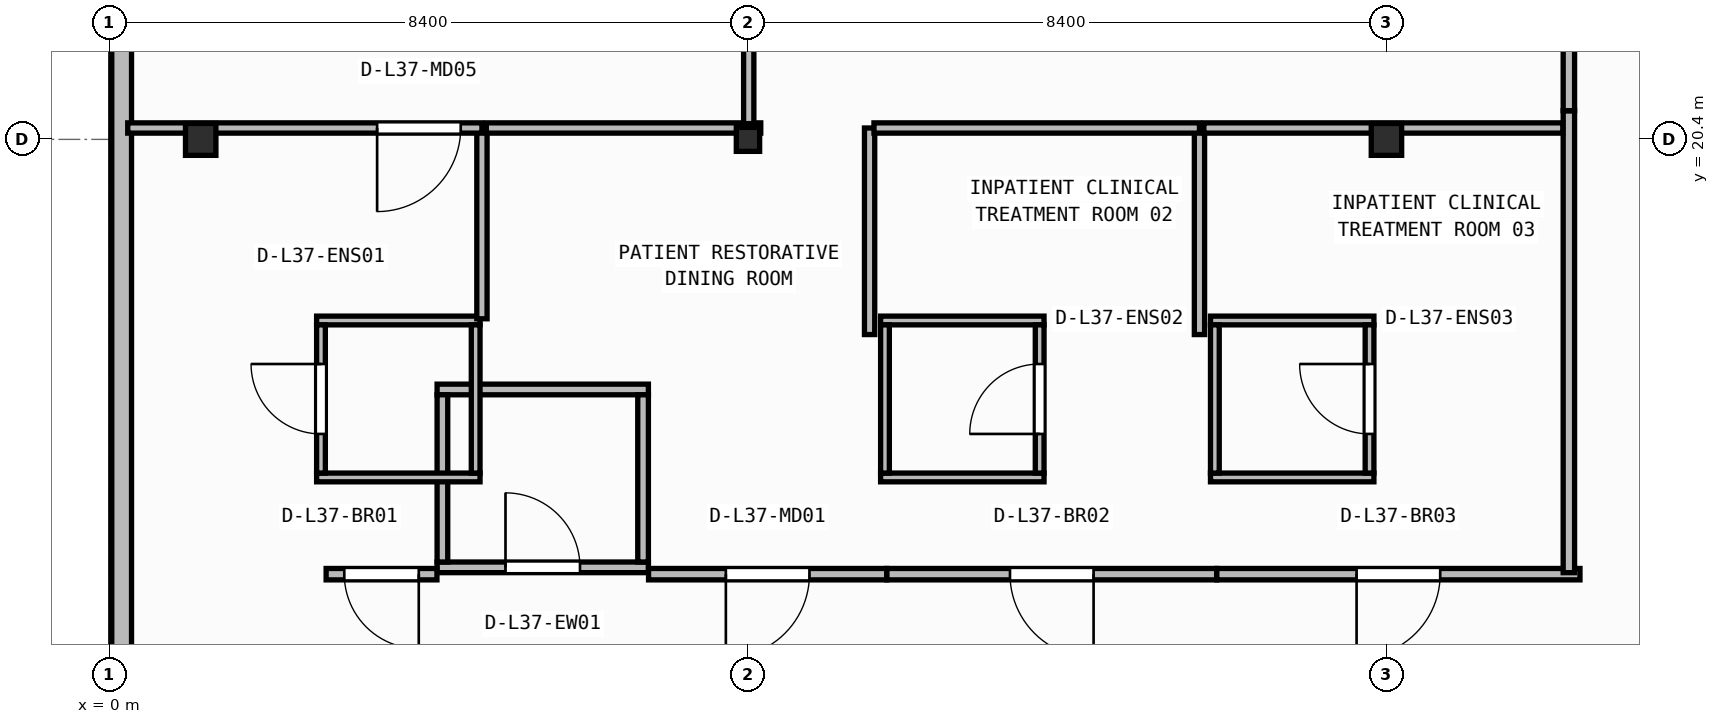
"""IFC4 building model, lengths in metres.
Left out: names, types, materials, properties, quantities, classifications, styles, units other than length and angle.
Written with IfcOpenShell. Run it as: python <this file> out.ifc"""

import sys

from ifc_helpers import new_model, si_unit, direction, frame, frame_2d, origin, origin_2d, place, context, subcontext, project, spatial, rectangle, i_section, extrude, element, fill, save


model = new_model("IFC4")
c1 = context("Model", 3, precision=1e-05, world=origin(), true_north=direction((0.0, 1.0)))
c2 = subcontext(c1, "Body", "Model", "MODEL_VIEW")
j1 = project(units=[si_unit("LENGTHUNIT", "METRE"), si_unit("PLANEANGLEUNIT", "RADIAN")], contexts=[c1])
p1 = place(None, origin())
s1 = spatial("IfcSite", under=j1, at=p1, CompositionType="ELEMENT")
p2 = place(p1, origin())
s2 = spatial("IfcBuilding", under=s1, at=p2, CompositionType="ELEMENT")
p3 = place(p2, frame((0.0, 0.0, 150.75)))
s3 = spatial("IfcBuildingStorey", under=s2, at=p3, CompositionType="ELEMENT", Elevation=150.75)
p4 = place(p3, frame((1.2, 20.4, 0.0), z_axis=(0.0, 0.0, 1.0), x_axis=(1.0, 0.0, 0.0)))
e1 = element("IfcColumn", 1, at=p4, inside=s3, PredefinedType="COLUMN", context=c2, shape_type="SweptSolid", body=[
    extrude(i_section(OverallWidth=0.4, OverallDepth=0.42, WebThickness=0.025, FlangeThickness=0.04, at=origin_2d()), origin(), (0.0, 0.0, 1.0), 3.95),
])
p5 = place(p3, frame((8.4, 20.4, 0.0), z_axis=(0.0, 0.0, 1.0), x_axis=(1.0, 0.0, 0.0)))
e2 = element("IfcColumn", 2, at=p5, inside=s3, PredefinedType="COLUMN", context=c2, shape_type="SweptSolid", body=[
    extrude(i_section(OverallWidth=0.307, OverallDepth=0.315, WebThickness=0.012, FlangeThickness=0.019, FilletRadius=0.017, at=origin_2d()), origin(), (0.0, 0.0, 1.0), 3.95),
])
p6 = place(p3, frame((16.8, 20.4, 0.0), z_axis=(0.0, 0.0, 1.0), x_axis=(1.0, 0.0, 0.0)))
e3 = element("IfcColumn", 3, at=p6, inside=s3, PredefinedType="COLUMN", context=c2, shape_type="SweptSolid", body=[
    extrude(i_section(OverallWidth=0.4, OverallDepth=0.42, WebThickness=0.025, FlangeThickness=0.04, at=origin_2d()), origin(), (0.0, 0.0, 1.0), 3.95),
])
p7 = place(p3, frame((0.16, 40.64, 0.0), z_axis=(0.0, 0.0, 1.0), x_axis=(0.0, -1.0, 0.0)))
e4 = element("IfcWall", 4, at=p7, inside=s3, PredefinedType="STANDARD", context=c2, shape_type="SweptSolid", body=[
    extrude(rectangle(XDim=37.88, YDim=0.26, at=frame_2d((18.94, 0.0))), origin(), (0.0, 0.0, 1.0), 3.71),
])
p8 = place(p7, frame((27.795, 0.0, 0.9)))
e5 = element("IfcOpeningElement", 5, at=p8, cuts=e4, PredefinedType="OPENING", context=c2, shape_type="SweptSolid", body=[
    extrude(rectangle(XDim=2.4, YDim=1.65, at=frame_2d((1.2, 0.825))), frame((0.0, 0.14, 0.0), z_axis=(0.0, -1.0, 0.0), x_axis=(1.0, 0.0, 0.0)), (0.0, 0.0, 1.0), 0.28),
])
p9 = place(p3, frame((4.31, 14.77, 0.0), z_axis=(0.0, 0.0, 1.0), x_axis=(1.0, 0.0, 0.0)))
e6 = element("IfcWall", 6, at=p9, inside=s3, PredefinedType="PARTITIONING", context=c2, shape_type="SweptSolid", body=[
    extrude(rectangle(XDim=2.78, YDim=0.14, at=frame_2d((1.39, 0.0))), origin(), (0.0, 0.0, 1.0), 3.71),
])
p10 = place(p9, frame((0.9, 0.0, 0.0)))
e7 = element("IfcOpeningElement", 7, at=p10, cuts=e6, PredefinedType="OPENING", context=c2, shape_type="SweptSolid", body=[
    extrude(rectangle(XDim=0.98, YDim=2.1, at=frame_2d((0.49, 1.05))), frame((0.0, 0.08, 0.0), z_axis=(0.0, -1.0, 0.0), x_axis=(1.0, 0.0, 0.0)), (0.0, 0.0, 1.0), 0.16),
])
p11 = place(p3, frame((4.31, 17.11, 0.0), z_axis=(0.0, 0.0, 1.0), x_axis=(1.0, 0.0, 0.0)))
e8 = element("IfcWall", 8, at=p11, inside=s3, PredefinedType="PARTITIONING", context=c2, shape_type="SweptSolid", body=[
    extrude(rectangle(XDim=2.78, YDim=0.14, at=frame_2d((1.39, 0.0))), origin(), (0.0, 0.0, 1.0), 3.71),
])
for number, where, z_axis, x_axis in (
    (9, (4.38, 14.84, 0.0), (0.0, 0.0, 1.0), (0.0, 1.0, 0.0)),
    (10, (7.02, 14.84, 0.0), (0.0, 0.0, 1.0), (0.0, 1.0, 0.0)),
):
    element("IfcWall", number, at=place(p3, frame(where, z_axis=z_axis, x_axis=x_axis)), inside=s3, PredefinedType="PARTITIONING", context=c2, shape_type="SweptSolid", body=[
        extrude(rectangle(XDim=2.2, YDim=0.14, at=frame_2d((1.1, 0.0))), origin(), (0.0, 0.0, 1.0), 3.71),
    ])
for number, where, z_axis, x_axis in (
    (11, (2.725, 15.952, 0.0), (0.0, 0.0, 1.0), (1.0, 0.0, 0.0)),
    (12, (2.725, 18.018, 0.0), (0.0, 0.0, 1.0), (1.0, 0.0, 0.0)),
):
    element("IfcWall", number, at=place(p3, frame(where, z_axis=z_axis, x_axis=x_axis)), inside=s3, PredefinedType="PARTITIONING", context=c2, shape_type="SweptSolid", body=[
        extrude(rectangle(XDim=2.15, YDim=0.115, at=frame_2d((1.075, 0.0))), origin(), (0.0, 0.0, 1.0), 3.71),
    ])
p12 = place(p3, frame((2.782, 16.01, 0.0), z_axis=(0.0, 0.0, 1.0), x_axis=(0.0, 1.0, 0.0)))
e13 = element("IfcWall", 13, at=p12, inside=s3, PredefinedType="PARTITIONING", context=c2, shape_type="SweptSolid", body=[
    extrude(rectangle(XDim=1.95, YDim=0.115, at=frame_2d((0.975, 0.0))), origin(), (0.0, 0.0, 1.0), 3.71),
])
p13 = place(p12, frame((0.515, 0.0, 0.0)))
e14 = element("IfcOpeningElement", 14, at=p13, cuts=e13, PredefinedType="OPENING", context=c2, shape_type="SweptSolid", body=[
    extrude(rectangle(XDim=0.92, YDim=2.1, at=frame_2d((0.46, 1.05))), frame((0.0, 0.067, 0.0), z_axis=(0.0, -1.0, 0.0), x_axis=(1.0, 0.0, 0.0)), (0.0, 0.0, 1.0), 0.135),
])
p14 = place(p3, frame((4.817, 16.01, 0.0), z_axis=(0.0, 0.0, 1.0), x_axis=(0.0, 1.0, 0.0)))
e15 = element("IfcWall", 15, at=p14, inside=s3, PredefinedType="PARTITIONING", context=c2, shape_type="SweptSolid", body=[
    extrude(rectangle(XDim=1.95, YDim=0.115, at=frame_2d((0.975, 0.0))), origin(), (0.0, 0.0, 1.0), 3.71),
])
for number, where, z_axis, x_axis in (
    (16, (10.145, 15.952, 0.0), (0.0, 0.0, 1.0), (1.0, 0.0, 0.0)),
    (17, (10.145, 18.018, 0.0), (0.0, 0.0, 1.0), (1.0, 0.0, 0.0)),
):
    element("IfcWall", number, at=place(p3, frame(where, z_axis=z_axis, x_axis=x_axis)), inside=s3, PredefinedType="PARTITIONING", context=c2, shape_type="SweptSolid", body=[
        extrude(rectangle(XDim=2.15, YDim=0.115, at=frame_2d((1.075, 0.0))), origin(), (0.0, 0.0, 1.0), 3.71),
    ])
p15 = place(p3, frame((10.202, 16.01, 0.0), z_axis=(0.0, 0.0, 1.0), x_axis=(0.0, 1.0, 0.0)))
e18 = element("IfcWall", 18, at=p15, inside=s3, PredefinedType="PARTITIONING", context=c2, shape_type="SweptSolid", body=[
    extrude(rectangle(XDim=1.95, YDim=0.115, at=frame_2d((0.975, 0.0))), origin(), (0.0, 0.0, 1.0), 3.71),
])
p16 = place(p3, frame((12.238, 16.01, 0.0), z_axis=(0.0, 0.0, 1.0), x_axis=(0.0, 1.0, 0.0)))
e19 = element("IfcWall", 19, at=p16, inside=s3, PredefinedType="PARTITIONING", context=c2, shape_type="SweptSolid", body=[
    extrude(rectangle(XDim=1.95, YDim=0.115, at=frame_2d((0.975, 0.0))), origin(), (0.0, 0.0, 1.0), 3.71),
])
p17 = place(p16, frame((0.515, 0.0, 0.0)))
e20 = element("IfcOpeningElement", 20, at=p17, cuts=e19, PredefinedType="OPENING", context=c2, shape_type="SweptSolid", body=[
    extrude(rectangle(XDim=0.92, YDim=2.1, at=frame_2d((0.46, 1.05))), frame((0.0, 0.067, 0.0), z_axis=(0.0, -1.0, 0.0), x_axis=(1.0, 0.0, 0.0)), (0.0, 0.0, 1.0), 0.135),
])
for number, where, z_axis, x_axis in (
    (21, (14.485, 15.952, 0.0), (0.0, 0.0, 1.0), (1.0, 0.0, 0.0)),
    (22, (14.485, 18.018, 0.0), (0.0, 0.0, 1.0), (1.0, 0.0, 0.0)),
):
    element("IfcWall", number, at=place(p3, frame(where, z_axis=z_axis, x_axis=x_axis)), inside=s3, PredefinedType="PARTITIONING", context=c2, shape_type="SweptSolid", body=[
        extrude(rectangle(XDim=2.15, YDim=0.115, at=frame_2d((1.075, 0.0))), origin(), (0.0, 0.0, 1.0), 3.71),
    ])
p18 = place(p3, frame((14.542, 16.01, 0.0), z_axis=(0.0, 0.0, 1.0), x_axis=(0.0, 1.0, 0.0)))
e23 = element("IfcWall", 23, at=p18, inside=s3, PredefinedType="PARTITIONING", context=c2, shape_type="SweptSolid", body=[
    extrude(rectangle(XDim=1.95, YDim=0.115, at=frame_2d((0.975, 0.0))), origin(), (0.0, 0.0, 1.0), 3.71),
])
p19 = place(p3, frame((16.577, 16.01, 0.0), z_axis=(0.0, 0.0, 1.0), x_axis=(0.0, 1.0, 0.0)))
e24 = element("IfcWall", 24, at=p19, inside=s3, PredefinedType="PARTITIONING", context=c2, shape_type="SweptSolid", body=[
    extrude(rectangle(XDim=1.95, YDim=0.115, at=frame_2d((0.975, 0.0))), origin(), (0.0, 0.0, 1.0), 3.71),
])
p20 = place(p19, frame((0.515, 0.0, 0.0)))
e25 = element("IfcOpeningElement", 25, at=p20, cuts=e24, PredefinedType="OPENING", context=c2, shape_type="SweptSolid", body=[
    extrude(rectangle(XDim=0.92, YDim=2.1, at=frame_2d((0.46, 1.05))), frame((0.0, 0.067, 0.0), z_axis=(0.0, -1.0, 0.0), x_axis=(1.0, 0.0, 0.0)), (0.0, 0.0, 1.0), 0.135),
])
p21 = place(p3, frame((4.308, 14.68, 0.0), z_axis=(0.0, 0.0, 1.0), x_axis=(-1.0, 0.0, 0.0)))
e26 = element("IfcWall", 26, at=p21, inside=s3, PredefinedType="PARTITIONING", context=c2, shape_type="SweptSolid", body=[
    extrude(rectangle(XDim=1.458, YDim=0.15, at=frame_2d((0.729, 0.0))), origin(), (0.0, 0.0, 1.0), 3.71),
])
p22 = place(p21, frame((0.239, 0.0, 0.0)))
e27 = element("IfcOpeningElement", 27, at=p22, cuts=e26, PredefinedType="OPENING", context=c2, shape_type="SweptSolid", body=[
    extrude(rectangle(XDim=0.98, YDim=2.1, at=frame_2d((0.49, 1.05))), frame((0.0, 0.085, 0.0), z_axis=(0.0, -1.0, 0.0), x_axis=(1.0, 0.0, 0.0)), (0.0, 0.0, 1.0), 0.17),
])
p23 = place(p3, frame((10.226, 14.68, 0.0), z_axis=(0.0, 0.0, 1.0), x_axis=(-1.0, 0.0, 0.0)))
e28 = element("IfcWall", 28, at=p23, inside=s3, PredefinedType="PARTITIONING", context=c2, shape_type="SweptSolid", body=[
    extrude(rectangle(XDim=3.134, YDim=0.15, at=frame_2d((1.567, 0.0))), origin(), (0.0, 0.0, 1.0), 3.71),
])
p24 = place(p23, frame((1.017, 0.0, 0.0)))
e29 = element("IfcOpeningElement", 29, at=p24, cuts=e28, PredefinedType="OPENING", context=c2, shape_type="SweptSolid", body=[
    extrude(rectangle(XDim=1.1, YDim=2.1, at=frame_2d((0.55, 1.05))), frame((0.0, 0.085, 0.0), z_axis=(0.0, -1.0, 0.0), x_axis=(1.0, 0.0, 0.0)), (0.0, 0.0, 1.0), 0.17),
])
p25 = place(p3, frame((14.566, 14.68, 0.0), z_axis=(0.0, 0.0, 1.0), x_axis=(-1.0, 0.0, 0.0)))
e30 = element("IfcWall", 30, at=p25, inside=s3, PredefinedType="PARTITIONING", context=c2, shape_type="SweptSolid", body=[
    extrude(rectangle(XDim=4.338, YDim=0.15, at=frame_2d((2.169, 0.0))), origin(), (0.0, 0.0, 1.0), 3.71),
])
p26 = place(p25, frame((1.619, 0.0, 0.0)))
e31 = element("IfcOpeningElement", 31, at=p26, cuts=e30, PredefinedType="OPENING", context=c2, shape_type="SweptSolid", body=[
    extrude(rectangle(XDim=1.1, YDim=2.1, at=frame_2d((0.55, 1.05))), frame((0.0, 0.085, 0.0), z_axis=(0.0, -1.0, 0.0), x_axis=(1.0, 0.0, 0.0)), (0.0, 0.0, 1.0), 0.17),
])
p27 = place(p3, frame((19.346, 14.68, 0.0), z_axis=(0.0, 0.0, 1.0), x_axis=(-1.0, 0.0, 0.0)))
e32 = element("IfcWall", 32, at=p27, inside=s3, PredefinedType="PARTITIONING", context=c2, shape_type="SweptSolid", body=[
    extrude(rectangle(XDim=4.778, YDim=0.15, at=frame_2d((2.389, 0.0))), origin(), (0.0, 0.0, 1.0), 3.71),
])
p28 = place(p27, frame((1.839, 0.0, 0.0)))
e33 = element("IfcOpeningElement", 33, at=p28, cuts=e32, PredefinedType="OPENING", context=c2, shape_type="SweptSolid", body=[
    extrude(rectangle(XDim=1.1, YDim=2.1, at=frame_2d((0.55, 1.05))), frame((0.0, 0.085, 0.0), z_axis=(0.0, -1.0, 0.0), x_axis=(1.0, 0.0, 0.0)), (0.0, 0.0, 1.0), 0.17),
])
p29 = place(p3, frame((19.2, 20.776, 0.0), z_axis=(0.0, 0.0, 1.0), x_axis=(0.0, -1.0, 0.0)))
e34 = element("IfcWall", 34, at=p29, inside=s3, PredefinedType="PARTITIONING", context=c2, shape_type="SweptSolid", body=[
    extrude(rectangle(XDim=6.076, YDim=0.15, at=frame_2d((3.038, 0.0))), origin(), (0.0, 0.0, 1.0), 3.71),
])
p30 = place(p3, frame((19.2, 27.26, 0.0), z_axis=(0.0, 0.0, 1.0), x_axis=(0.0, -1.0, 0.0)))
e35 = element("IfcWall", 35, at=p30, inside=s3, PredefinedType="PARTITIONING", context=c2, shape_type="SweptSolid", body=[
    extrude(rectangle(XDim=6.482, YDim=0.15, at=frame_2d((3.241, 0.0))), origin(), (0.0, 0.0, 1.0), 3.71),
])
p31 = place(p30, frame((2.068, 0.0, 0.0)))
e36 = element("IfcOpeningElement", 36, at=p31, cuts=e35, PredefinedType="OPENING", context=c2, shape_type="SweptSolid", body=[
    extrude(rectangle(XDim=1.1, YDim=2.1, at=frame_2d((0.55, 1.05))), frame((0.0, 0.085, 0.0), z_axis=(0.0, -1.0, 0.0), x_axis=(1.0, 0.0, 0.0)), (0.0, 0.0, 1.0), 0.17),
])
p32 = place(p3, frame((4.9, 18.04, 0.0), z_axis=(0.0, 0.0, 1.0), x_axis=(0.0, 1.0, 0.0)))
e37 = element("IfcWall", 37, at=p32, inside=s3, PredefinedType="PARTITIONING", context=c2, shape_type="SweptSolid", body=[
    extrude(rectangle(XDim=2.51, YDim=0.135, at=frame_2d((1.255, 0.0))), origin(), (0.0, 0.0, 1.0), 3.71),
])
p33 = place(p3, frame((4.9, 20.55, 0.0), z_axis=(0.0, 0.0, 1.0), x_axis=(-1.0, 0.0, 0.0)))
e38 = element("IfcWall", 38, at=p33, inside=s3, PredefinedType="PARTITIONING", context=c2, shape_type="SweptSolid", body=[
    extrude(rectangle(XDim=4.66, YDim=0.135, at=frame_2d((2.33, 0.0))), origin(), (0.0, 0.0, 1.0), 3.083),
])
p34 = place(p33, frame((0.279, 0.0, 0.0)))
e39 = element("IfcOpeningElement", 39, at=p34, cuts=e38, PredefinedType="OPENING", context=c2, shape_type="SweptSolid", body=[
    extrude(rectangle(XDim=1.1, YDim=2.1, at=frame_2d((0.55, 1.05))), frame((0.0, 0.077, 0.0), z_axis=(0.0, -1.0, 0.0), x_axis=(1.0, 0.0, 0.0)), (0.0, 0.0, 1.0), 0.155),
])
p35 = place(p3, frame((10.0, 17.833, 0.0), z_axis=(0.0, 0.0, 1.0), x_axis=(0.0, 1.0, 0.0)))
e40 = element("IfcWall", 40, at=p35, inside=s3, PredefinedType="PARTITIONING", context=c2, shape_type="SweptSolid", body=[
    extrude(rectangle(XDim=2.718, YDim=0.135, at=frame_2d((1.359, 0.0))), origin(), (0.0, 0.0, 1.0), 3.71),
])
p36 = place(p3, frame((8.568, 20.55, 0.0), z_axis=(0.0, 0.0, 1.0), x_axis=(-1.0, 0.0, 0.0)))
e41 = element("IfcWall", 41, at=p36, inside=s3, PredefinedType="PARTITIONING", context=c2, shape_type="SweptSolid", body=[
    extrude(rectangle(XDim=3.611, YDim=0.135, at=frame_2d((1.805, 0.0))), origin(), (0.0, 0.0, 1.0), 3.083),
])
p37 = place(p3, frame((14.34, 17.833, 0.0), z_axis=(0.0, 0.0, 1.0), x_axis=(0.0, 1.0, 0.0)))
e42 = element("IfcWall", 42, at=p37, inside=s3, PredefinedType="PARTITIONING", context=c2, shape_type="SweptSolid", body=[
    extrude(rectangle(XDim=2.718, YDim=0.135, at=frame_2d((1.359, 0.0))), origin(), (0.0, 0.0, 1.0), 3.71),
])
p38 = place(p3, frame((14.34, 20.55, 0.0), z_axis=(0.0, 0.0, 1.0), x_axis=(-1.0, 0.0, 0.0)))
e43 = element("IfcWall", 43, at=p38, inside=s3, PredefinedType="PARTITIONING", context=c2, shape_type="SweptSolid", body=[
    extrude(rectangle(XDim=4.282, YDim=0.135, at=frame_2d((2.141, 0.0))), origin(), (0.0, 0.0, 1.0), 3.083),
])
p39 = place(p3, frame((19.12, 20.55, 0.0), z_axis=(0.0, 0.0, 1.0), x_axis=(-1.0, 0.0, 0.0)))
e44 = element("IfcWall", 44, at=p39, inside=s3, PredefinedType="PARTITIONING", context=c2, shape_type="SweptSolid", body=[
    extrude(rectangle(XDim=4.723, YDim=0.135, at=frame_2d((2.361, 0.0))), origin(), (0.0, 0.0, 1.0), 3.083),
])
p40 = place(p3, frame((8.41, 20.607, 0.0), z_axis=(0.0, 0.0, 1.0), x_axis=(0.0, 1.0, 0.0)))
e45 = element("IfcWall", 45, at=p40, inside=s3, PredefinedType="PARTITIONING", context=c2, shape_type="SweptSolid", body=[
    extrude(rectangle(XDim=6.493, YDim=0.135, at=frame_2d((3.246, 0.0))), origin(), (0.0, 0.0, 1.0), 3.152),
])
p41 = place(p10, origin())
e46 = element("IfcDoor", 46, at=p41, inside=s3, OperationType="SINGLE_SWING_LEFT", PredefinedType="DOOR", context=c2, shape_type="SweptSolid", body=[
    extrude(rectangle(XDim=0.98, YDim=2.1, at=frame_2d((0.49, 1.05))), frame((0.0, 0.025, 0.0), z_axis=(0.0, -1.0, 0.0), x_axis=(1.0, 0.0, 0.0)), (0.0, 0.0, 1.0), 0.05),
])
fill(e7, e46)
p42 = place(p13, origin())
e47 = element("IfcDoor", 47, at=p42, inside=s3, OperationType="SINGLE_SWING_RIGHT", PredefinedType="DOOR", context=c2, shape_type="SweptSolid", body=[
    extrude(rectangle(XDim=0.92, YDim=2.1, at=frame_2d((0.46, 1.05))), frame((0.0, 0.025, 0.0), z_axis=(0.0, -1.0, 0.0), x_axis=(1.0, 0.0, 0.0)), (0.0, 0.0, 1.0), 0.05),
])
fill(e14, e47)
p43 = place(p17, origin())
e48 = element("IfcDoor", 48, at=p43, inside=s3, OperationType="SINGLE_SWING_LEFT", PredefinedType="DOOR", context=c2, shape_type="SweptSolid", body=[
    extrude(rectangle(XDim=0.92, YDim=2.1, at=frame_2d((0.46, 1.05))), frame((0.0, 0.025, 0.0), z_axis=(0.0, -1.0, 0.0), x_axis=(1.0, 0.0, 0.0)), (0.0, 0.0, 1.0), 0.05),
])
fill(e20, e48)
p44 = place(p20, origin())
e49 = element("IfcDoor", 49, at=p44, inside=s3, OperationType="SINGLE_SWING_RIGHT", PredefinedType="DOOR", context=c2, shape_type="SweptSolid", body=[
    extrude(rectangle(XDim=0.92, YDim=2.1, at=frame_2d((0.46, 1.05))), frame((0.0, 0.025, 0.0), z_axis=(0.0, -1.0, 0.0), x_axis=(1.0, 0.0, 0.0)), (0.0, 0.0, 1.0), 0.05),
])
fill(e25, e49)
p45 = place(p22, origin())
e50 = element("IfcDoor", 50, at=p45, inside=s3, OperationType="SINGLE_SWING_LEFT", PredefinedType="DOOR", context=c2, shape_type="SweptSolid", body=[
    extrude(rectangle(XDim=0.98, YDim=2.1, at=frame_2d((0.49, 1.05))), frame((0.0, 0.025, 0.0), z_axis=(0.0, -1.0, 0.0), x_axis=(1.0, 0.0, 0.0)), (0.0, 0.0, 1.0), 0.05),
])
fill(e27, e50)
p46 = place(p24, origin())
e51 = element("IfcDoor", 51, at=p46, inside=s3, OperationType="SINGLE_SWING_RIGHT", PredefinedType="DOOR", context=c2, shape_type="SweptSolid", body=[
    extrude(rectangle(XDim=1.1, YDim=2.1, at=frame_2d((0.55, 1.05))), frame((0.0, 0.025, 0.0), z_axis=(0.0, -1.0, 0.0), x_axis=(1.0, 0.0, 0.0)), (0.0, 0.0, 1.0), 0.05),
])
fill(e29, e51)
p47 = place(p26, origin())
e52 = element("IfcDoor", 52, at=p47, inside=s3, OperationType="SINGLE_SWING_LEFT", PredefinedType="DOOR", context=c2, shape_type="SweptSolid", body=[
    extrude(rectangle(XDim=1.1, YDim=2.1, at=frame_2d((0.55, 1.05))), frame((0.0, 0.025, 0.0), z_axis=(0.0, -1.0, 0.0), x_axis=(1.0, 0.0, 0.0)), (0.0, 0.0, 1.0), 0.05),
])
fill(e31, e52)
p48 = place(p28, origin())
e53 = element("IfcDoor", 53, at=p48, inside=s3, OperationType="SINGLE_SWING_RIGHT", PredefinedType="DOOR", context=c2, shape_type="SweptSolid", body=[
    extrude(rectangle(XDim=1.1, YDim=2.1, at=frame_2d((0.55, 1.05))), frame((0.0, 0.025, 0.0), z_axis=(0.0, -1.0, 0.0), x_axis=(1.0, 0.0, 0.0)), (0.0, 0.0, 1.0), 0.05),
])
fill(e33, e53)
p49 = place(p34, origin())
e54 = element("IfcDoor", 54, at=p49, inside=s3, OperationType="SINGLE_SWING_RIGHT", PredefinedType="DOOR", context=c2, shape_type="SweptSolid", body=[
    extrude(rectangle(XDim=1.1, YDim=2.1, at=frame_2d((0.55, 1.05))), frame((0.0, 0.025, 0.0), z_axis=(0.0, -1.0, 0.0), x_axis=(1.0, 0.0, 0.0)), (0.0, 0.0, 1.0), 0.05),
])
fill(e39, e54)
save(model, sys.argv[1])
